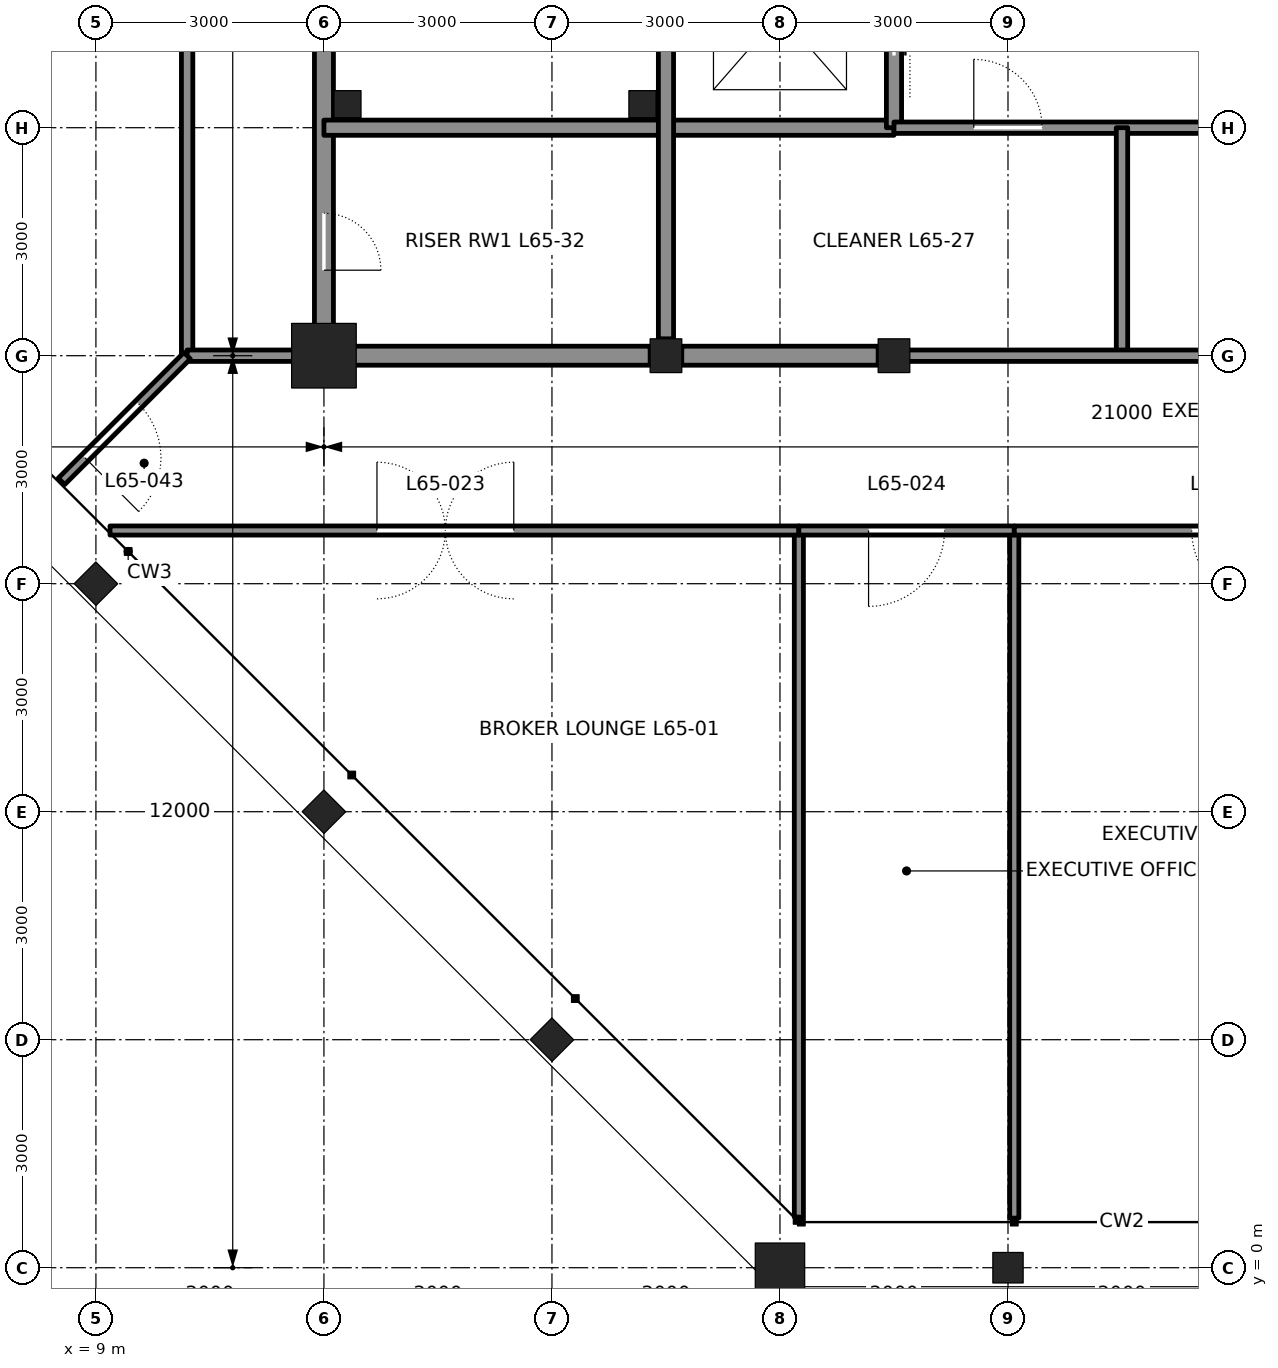
"""IFC4 building model, lengths in metres.
Left out: names, types, materials, properties, quantities, classifications, styles, units other than length and angle.
Written with IfcOpenShell. Run it as: python <this file> out.ifc"""

import sys

from ifc_helpers import new_model, si_unit, direction, frame, frame_2d, origin, origin_2d, place, context, subcontext, project, spatial, rectangle, hollow_rectangle, i_section, extrude, element, fill, save


model = new_model("IFC4")
c1 = context("Model", 3, precision=1e-05, world=origin(), true_north=direction((0.0, 1.0)))
c2 = subcontext(c1, "Body", "Model", "MODEL_VIEW")
j1 = project(units=[si_unit("LENGTHUNIT", "METRE"), si_unit("PLANEANGLEUNIT", "RADIAN")], contexts=[c1])
p1 = place(None, origin())
s1 = spatial("IfcSite", under=j1, at=p1, CompositionType="ELEMENT")
p2 = place(p1, origin())
s2 = spatial("IfcBuilding", under=s1, at=p2, CompositionType="ELEMENT")
p3 = place(p2, frame((0.0, 0.0, 291.6)))
s3 = spatial("IfcBuildingStorey", under=s2, at=p3, CompositionType="ELEMENT", Elevation=291.6)
p4 = place(p3, frame((18.0, 0.0, 0.0), z_axis=(0.0, 0.0, 1.0), x_axis=(0.0, -1.0, 0.0)))
e1 = element("IfcColumn", 1, at=p4, inside=s3, PredefinedType="COLUMN", context=c2, shape_type="SweptSolid", body=[
    extrude(hollow_rectangle(XDim=0.65, YDim=0.65, WallThickness=0.065, at=origin_2d()), origin(), (0.0, 0.0, 1.0), 4.2),
])
p5 = place(p3, frame((21.0, 0.0, 0.0), z_axis=(0.0, 0.0, 1.0), x_axis=(0.0, -1.0, 0.0)))
e2 = element("IfcColumn", 2, at=p5, inside=s3, PredefinedType="COLUMN", context=c2, shape_type="SweptSolid", body=[
    extrude(i_section(OverallWidth=0.401, OverallDepth=0.399, WebThickness=0.025, FlangeThickness=0.04, at=origin_2d()), origin(), (0.0, 0.0, 1.0), 4.2),
])
for number, where, z_axis, x_axis in (
    (3, (9.0, 9.0, 0.0), (0.0, 0.0, 1.0), (-0.707, -0.707, 0.0)),
    (4, (12.0, 6.0, 0.0), (0.0, 0.0, 1.0), (-0.707, -0.707, 0.0)),
    (5, (15.0, 3.0, 0.0), (0.0, 0.0, 1.0), (-0.707, -0.707, 0.0)),
):
    element("IfcColumn", number, at=place(p3, frame(where, z_axis=z_axis, x_axis=x_axis)), inside=s3, PredefinedType="COLUMN", context=c2, shape_type="SweptSolid", body=[
        extrude(i_section(OverallWidth=0.404, OverallDepth=0.406, WebThickness=0.027, FlangeThickness=0.044, at=origin_2d()), origin(), (0.0, 0.0, 1.0), 4.2),
    ])
p6 = place(p3, frame((12.0, 12.0, 0.0), z_axis=(0.0, 0.0, 1.0), x_axis=(1.0, 0.0, 0.0)))
e6 = element("IfcColumn", 6, at=p6, inside=s3, PredefinedType="COLUMN", context=c2, shape_type="SweptSolid", body=[
    extrude(hollow_rectangle(XDim=0.85, YDim=0.85, WallThickness=0.085, at=origin_2d()), origin(), (0.0, 0.0, 1.0), 4.2),
])
for number, where, z_axis, x_axis in (
    (7, (16.5, 12.0, 0.0), (0.0, 0.0, 1.0), (1.0, 0.0, 0.0)),
    (8, (19.5, 12.0, 0.0), (0.0, 0.0, 1.0), (1.0, 0.0, 0.0)),
):
    element("IfcColumn", number, at=place(p3, frame(where, z_axis=z_axis, x_axis=x_axis)), inside=s3, PredefinedType="COLUMN", context=c2, shape_type="SweptSolid", body=[
        extrude(i_section(OverallWidth=0.417, OverallDepth=0.445, WebThickness=0.039, FlangeThickness=0.063, at=origin_2d()), origin(), (0.0, 0.0, 1.0), 4.2),
    ])
p7 = place(p3, frame((12.0, 12.25, 0.0), z_axis=(0.0, 0.0, 1.0), x_axis=(0.0, 1.0, 0.0)))
e9 = element("IfcWall", 9, at=p7, inside=s3, PredefinedType="SOLIDWALL", context=c2, shape_type="SweptSolid", body=[
    extrude(rectangle(XDim=8.528, YDim=0.25, at=frame_2d((4.264, 0.0))), origin(), (0.0, 0.0, 1.0), 3.113),
])
p8 = place(p7, frame((0.875, 0.0, 0.0)))
e10 = element("IfcOpeningElement", 10, at=p8, cuts=e9, PredefinedType="OPENING", context=c2, shape_type="SweptSolid", body=[
    extrude(rectangle(XDim=0.75, YDim=2.1, at=frame_2d((0.375, 1.05))), frame((0.0, 0.135, 0.0), z_axis=(0.0, -1.0, 0.0), x_axis=(1.0, 0.0, 0.0)), (0.0, 0.0, 1.0), 0.27),
])
p9 = place(p3, frame((12.25, 12.0, 0.0), z_axis=(0.0, 0.0, 1.0), x_axis=(1.0, 0.0, 0.0)))
e11 = element("IfcWall", 11, at=p9, inside=s3, PredefinedType="SOLIDWALL", context=c2, shape_type="SweptSolid", body=[
    extrude(rectangle(XDim=4.042, YDim=0.25, at=frame_2d((2.021, 0.0))), origin(), (0.0, 0.0, 1.0), 3.181),
])
p10 = place(p3, frame((16.708, 12.0, 0.0), z_axis=(0.0, 0.0, 1.0), x_axis=(1.0, 0.0, 0.0)))
e12 = element("IfcWall", 12, at=p10, inside=s3, PredefinedType="SOLIDWALL", context=c2, shape_type="SweptSolid", body=[
    extrude(rectangle(XDim=2.583, YDim=0.25, at=frame_2d((1.292, 0.0))), origin(), (0.0, 0.0, 1.0), 3.181),
])
p11 = place(p3, frame((12.0, 15.0, 0.0), z_axis=(0.0, 0.0, 1.0), x_axis=(1.0, 0.0, 0.0)))
e13 = element("IfcWall", 13, at=p11, inside=s3, PredefinedType="SOLIDWALL", context=c2, shape_type="SweptSolid", body=[
    extrude(rectangle(XDim=7.5, YDim=0.2, at=frame_2d((3.75, 0.0))), origin(), (0.0, 0.0, 1.0), 4.04),
])
p12 = place(p3, frame((16.5, 12.222, 0.0), z_axis=(0.0, 0.0, 1.0), x_axis=(0.0, 1.0, 0.0)))
e14 = element("IfcWall", 14, at=p12, inside=s3, PredefinedType="SOLIDWALL", context=c2, shape_type="SweptSolid", body=[
    extrude(rectangle(XDim=8.555, YDim=0.2, at=frame_2d((4.278, 0.0))), origin(), (0.0, 0.0, 1.0), 3.113),
])
p13 = place(p3, frame((19.5, 15.0, 0.0), z_axis=(0.0, 0.0, 1.0), x_axis=(0.0, 1.0, 0.0)))
e15 = element("IfcWall", 15, at=p13, inside=s3, PredefinedType="SOLIDWALL", context=c2, shape_type="SweptSolid", body=[
    extrude(rectangle(XDim=12.0, YDim=0.2, at=frame_2d((6.0, 0.0))), origin(), (0.0, 0.0, 1.0), 3.064),
])
p14 = place(p13, frame((0.95, 0.0, 0.0)))
e16 = element("IfcOpeningElement", 16, at=p14, cuts=e15, PredefinedType="OPENING", context=c2, shape_type="SweptSolid", body=[
    extrude(rectangle(XDim=1.1, YDim=2.1, at=frame_2d((0.55, 1.05))), frame((0.0, 0.11, 0.0), z_axis=(0.0, -1.0, 0.0), x_axis=(1.0, 0.0, 0.0)), (0.0, 0.0, 1.0), 0.22),
])
p15 = place(p13, frame((3.95, 0.0, 0.0)))
e17 = element("IfcOpeningElement", 17, at=p15, cuts=e15, PredefinedType="OPENING", context=c2, shape_type="SweptSolid", body=[
    extrude(rectangle(XDim=1.1, YDim=2.1, at=frame_2d((0.55, 1.05))), frame((0.0, 0.11, 0.0), z_axis=(0.0, -1.0, 0.0), x_axis=(1.0, 0.0, 0.0)), (0.0, 0.0, 1.0), 0.22),
])
p16 = place(p13, frame((6.95, 0.0, 0.0)))
e18 = element("IfcOpeningElement", 18, at=p16, cuts=e15, PredefinedType="OPENING", context=c2, shape_type="SweptSolid", body=[
    extrude(rectangle(XDim=1.1, YDim=2.1, at=frame_2d((0.55, 1.05))), frame((0.0, 0.11, 0.0), z_axis=(0.0, -1.0, 0.0), x_axis=(1.0, 0.0, 0.0)), (0.0, 0.0, 1.0), 0.22),
])
p17 = place(p13, frame((9.95, 0.0, 0.0)))
e19 = element("IfcOpeningElement", 19, at=p17, cuts=e15, PredefinedType="OPENING", context=c2, shape_type="SweptSolid", body=[
    extrude(rectangle(XDim=1.1, YDim=2.1, at=frame_2d((0.55, 1.05))), frame((0.0, 0.11, 0.0), z_axis=(0.0, -1.0, 0.0), x_axis=(1.0, 0.0, 0.0)), (0.0, 0.0, 1.0), 0.22),
])
p18 = place(p3, frame((19.5, 15.0, 0.0), z_axis=(0.0, 0.0, 1.0), x_axis=(1.0, 0.0, 0.0)))
e20 = element("IfcWall", 20, at=p18, inside=s3, PredefinedType="PARTITIONING", context=c2, shape_type="SweptSolid", body=[
    extrude(rectangle(XDim=6.0, YDim=0.15, at=frame_2d((3.0, 0.0))), origin(), (0.0, 0.0, 1.0), 4.04),
])
p19 = place(p18, frame((4.0, 0.0, 0.0)))
e21 = element("IfcOpeningElement", 21, at=p19, cuts=e20, PredefinedType="OPENING", context=c2, shape_type="SweptSolid", body=[
    extrude(rectangle(XDim=1.0, YDim=2.1, at=frame_2d((0.5, 1.05))), frame((0.0, 0.085, 0.0), z_axis=(0.0, -1.0, 0.0), x_axis=(1.0, 0.0, 0.0)), (0.0, 0.0, 1.0), 0.17),
])
p20 = place(p18, frame((1.05, 0.0, 0.0)))
e22 = element("IfcOpeningElement", 22, at=p20, cuts=e20, PredefinedType="OPENING", context=c2, shape_type="SweptSolid", body=[
    extrude(rectangle(XDim=0.9, YDim=2.1, at=frame_2d((0.45, 1.05))), frame((0.0, 0.085, 0.0), z_axis=(0.0, -1.0, 0.0), x_axis=(1.0, 0.0, 0.0)), (0.0, 0.0, 1.0), 0.17),
])
p21 = place(p3, frame((22.5, 15.0, 0.0), z_axis=(0.0, 0.0, 1.0), x_axis=(0.0, -1.0, 0.0)))
e23 = element("IfcWall", 23, at=p21, inside=s3, PredefinedType="PARTITIONING", context=c2, shape_type="SweptSolid", body=[
    extrude(rectangle(XDim=3.0, YDim=0.15, at=frame_2d((1.5, 0.0))), origin(), (0.0, 0.0, 1.0), 4.04),
])
p22 = place(p3, frame((19.5, 12.0, 0.0), z_axis=(0.0, 0.0, 1.0), x_axis=(1.0, 0.0, 0.0)))
e24 = element("IfcWall", 24, at=p22, inside=s3, PredefinedType="PARTITIONING", context=c2, shape_type="SweptSolid", body=[
    extrude(rectangle(XDim=6.0, YDim=0.15, at=frame_2d((3.0, 0.0))), origin(), (0.0, 0.0, 1.0), 3.181),
])
p23 = place(p3, frame((18.249, 0.666, 0.0), z_axis=(0.0, 0.0, 1.0), x_axis=(0.0, 1.0, 0.0)))
e25 = element("IfcWall", 25, at=p23, inside=s3, PredefinedType="PARTITIONING", context=c2, shape_type="SweptSolid", body=[
    extrude(rectangle(XDim=9.034, YDim=0.12, at=frame_2d((4.517, 0.0))), origin(), (0.0, 0.0, 1.0), 4.04),
])
p24 = place(p3, frame((21.083, 0.653, 0.0), z_axis=(0.0, 0.0, 1.0), x_axis=(0.0, 1.0, 0.0)))
e26 = element("IfcWall", 26, at=p24, inside=s3, PredefinedType="PARTITIONING", context=c2, shape_type="SweptSolid", body=[
    extrude(rectangle(XDim=9.047, YDim=0.12, at=frame_2d((4.524, 0.0))), origin(), (0.0, 0.0, 1.0), 3.357),
])
p25 = place(p3, frame((9.186, 9.7, 0.0), z_axis=(0.0, 0.0, 1.0), x_axis=(1.0, 0.0, 0.0)))
e27 = element("IfcWall", 27, at=p25, inside=s3, PredefinedType="PARTITIONING", context=c2, shape_type="SweptSolid", body=[
    extrude(rectangle(XDim=9.063, YDim=0.12, at=frame_2d((4.531, 0.0))), origin(), (0.0, 0.0, 1.0), 4.04),
])
p26 = place(p25, frame((3.512, 0.0, 0.0)))
e28 = element("IfcOpeningElement", 28, at=p26, cuts=e27, PredefinedType="OPENING", context=c2, shape_type="SweptSolid", body=[
    extrude(rectangle(XDim=1.8, YDim=2.4, at=frame_2d((0.9, 1.2))), frame((0.0, 0.07, 0.0), z_axis=(0.0, -1.0, 0.0), x_axis=(1.0, 0.0, 0.0)), (0.0, 0.0, 1.0), 0.14),
])
p27 = place(p3, frame((18.249, 9.7, 0.0), z_axis=(0.0, 0.0, 1.0), x_axis=(1.0, 0.0, 0.0)))
e29 = element("IfcWall", 29, at=p27, inside=s3, PredefinedType="PARTITIONING", context=c2, shape_type="SweptSolid", body=[
    extrude(rectangle(XDim=2.834, YDim=0.12, at=frame_2d((1.417, 0.0))), origin(), (0.0, 0.0, 1.0), 4.04),
])
p28 = place(p27, frame((0.917, 0.0, 0.0)))
e30 = element("IfcOpeningElement", 30, at=p28, cuts=e29, PredefinedType="OPENING", context=c2, shape_type="SweptSolid", body=[
    extrude(rectangle(XDim=1.0, YDim=2.4, at=frame_2d((0.5, 1.2))), frame((0.0, 0.07, 0.0), z_axis=(0.0, -1.0, 0.0), x_axis=(1.0, 0.0, 0.0)), (0.0, 0.0, 1.0), 0.14),
])
p29 = place(p3, frame((21.083, 9.7, 0.0), z_axis=(0.0, 0.0, 1.0), x_axis=(1.0, 0.0, 0.0)))
e31 = element("IfcWall", 31, at=p29, inside=s3, PredefinedType="PARTITIONING", context=c2, shape_type="SweptSolid", body=[
    extrude(rectangle(XDim=5.669, YDim=0.12, at=frame_2d((2.834, 0.0))), origin(), (0.0, 0.0, 1.0), 4.04),
])
p30 = place(p29, frame((2.334, 0.0, 0.0)))
e32 = element("IfcOpeningElement", 32, at=p30, cuts=e31, PredefinedType="OPENING", context=c2, shape_type="SweptSolid", body=[
    extrude(rectangle(XDim=1.0, YDim=2.4, at=frame_2d((0.5, 1.2))), frame((0.0, 0.07, 0.0), z_axis=(0.0, -1.0, 0.0), x_axis=(1.0, 0.0, 0.0)), (0.0, 0.0, 1.0), 0.14),
])
p31 = place(p3, frame((10.2, 12.0, 0.0), z_axis=(0.0, 0.0, 1.0), x_axis=(0.0, 1.0, 0.0)))
e33 = element("IfcWall", 33, at=p31, inside=s3, PredefinedType="PARTITIONING", context=c2, shape_type="SweptSolid", body=[
    extrude(rectangle(XDim=24.314, YDim=0.15, at=frame_2d((12.157, 0.0))), origin(), (0.0, 0.0, 1.0), 4.04),
])
p32 = place(p31, frame((11.5, 0.0, 0.0)))
e34 = element("IfcOpeningElement", 34, at=p32, cuts=e33, PredefinedType="OPENING", context=c2, shape_type="SweptSolid", body=[
    extrude(rectangle(XDim=1.0, YDim=2.4, at=frame_2d((0.5, 1.2))), frame((0.0, 0.085, 0.0), z_axis=(0.0, -1.0, 0.0), x_axis=(1.0, 0.0, 0.0)), (0.0, 0.0, 1.0), 0.17),
])
p33 = place(p3, frame((10.2, 12.0, 0.0), z_axis=(0.0, 0.0, 1.0), x_axis=(1.0, 0.0, 0.0)))
e35 = element("IfcWall", 35, at=p33, inside=s3, PredefinedType="PARTITIONING", context=c2, shape_type="SweptSolid", body=[
    extrude(rectangle(XDim=1.8, YDim=0.15, at=frame_2d((0.9, 0.0))), origin(), (0.0, 0.0, 1.0), 3.27),
])
p34 = place(p3, frame((10.2, 12.0, 0.0), z_axis=(0.0, 0.0, 1.0), x_axis=(-0.707106781187, -0.707106781187, 0.0)))
e36 = element("IfcWall", 36, at=p34, inside=s3, PredefinedType="PARTITIONING", context=c2, shape_type="SweptSolid", body=[
    extrude(rectangle(XDim=2.338, YDim=0.12, at=frame_2d((1.169, 0.0))), origin(), (0.0, 0.0, 1.0), 4.04),
])
p35 = place(p34, frame((0.9, 0.0, 0.0)))
e37 = element("IfcOpeningElement", 37, at=p35, cuts=e36, PredefinedType="OPENING", context=c2, shape_type="SweptSolid", body=[
    extrude(rectangle(XDim=1.0, YDim=2.4, at=frame_2d((0.5, 1.2))), frame((0.0, 0.07, 0.0), z_axis=(0.0, -1.0, 0.0), x_axis=(1.0, 0.0, 0.0)), (0.0, 0.0, 1.0), 0.14),
])
for number, where, z_axis, x_axis in (
    (38, (12.31, 15.31, 0.0), (0.0, 0.0, 1.0), (1.0, 0.0, 0.0)),
    (39, (16.19, 15.31, 0.0), (0.0, 0.0, 1.0), (1.0, 0.0, 0.0)),
):
    element("IfcColumn", number, at=place(p3, frame(where, z_axis=z_axis, x_axis=x_axis)), inside=s3, PredefinedType="COLUMN", context=c2, shape_type="SweptSolid", body=[
        extrude(hollow_rectangle(XDim=0.356, YDim=0.356, WallThickness=0.009, at=origin_2d()), origin(), (0.0, 0.0, 1.0), 4.2),
    ])
p36 = place(p8, frame((0.75, 0.0, 0.0), z_axis=(0.0, 0.0, 1.0), x_axis=(-1.0, 0.0, 0.0)))
e40 = element("IfcDoor", 40, at=p36, inside=s3, OperationType="SINGLE_SWING_RIGHT", PredefinedType="DOOR", context=c2, shape_type="SweptSolid", body=[
    extrude(rectangle(XDim=0.75, YDim=2.1, at=frame_2d((0.375, 1.05))), frame((0.0, 0.025, 0.0), z_axis=(0.0, -1.0, 0.0), x_axis=(1.0, 0.0, 0.0)), (0.0, 0.0, 1.0), 0.05),
])
fill(e10, e40)
p37 = place(p20, origin())
e41 = element("IfcDoor", 41, at=p37, inside=s3, OperationType="SINGLE_SWING_LEFT", PredefinedType="DOOR", context=c2, shape_type="SweptSolid", body=[
    extrude(rectangle(XDim=0.9, YDim=2.1, at=frame_2d((0.45, 1.05))), frame((0.0, 0.025, 0.0), z_axis=(0.0, -1.0, 0.0), x_axis=(1.0, 0.0, 0.0)), (0.0, 0.0, 1.0), 0.05),
])
fill(e22, e41)
p38 = place(p14, origin())
e42 = element("IfcDoor", 42, at=p38, inside=s3, OperationType="DOUBLE_DOOR_SLIDING", PredefinedType="DOOR", context=c2, shape_type="SweptSolid", body=[
    extrude(rectangle(XDim=1.1, YDim=2.1, at=frame_2d((0.55, 1.05))), frame((0.0, 0.025, 0.0), z_axis=(0.0, -1.0, 0.0), x_axis=(1.0, 0.0, 0.0)), (0.0, 0.0, 1.0), 0.05),
])
fill(e16, e42)
p39 = place(p26, origin())
e43 = element("IfcDoor", 43, at=p39, inside=s3, OperationType="DOUBLE_DOOR_DOUBLE_SWING", PredefinedType="DOOR", context=c2, shape_type="SweptSolid", body=[
    extrude(rectangle(XDim=1.8, YDim=2.4, at=frame_2d((0.9, 1.2))), frame((0.0, 0.025, 0.0), z_axis=(0.0, -1.0, 0.0), x_axis=(1.0, 0.0, 0.0)), (0.0, 0.0, 1.0), 0.05),
])
fill(e28, e43)
p40 = place(p28, frame((1.0, 0.0, 0.0), z_axis=(0.0, 0.0, 1.0), x_axis=(-1.0, 0.0, 0.0)))
e44 = element("IfcDoor", 44, at=p40, inside=s3, OperationType="SINGLE_SWING_RIGHT", PredefinedType="DOOR", context=c2, shape_type="SweptSolid", body=[
    extrude(rectangle(XDim=1.0, YDim=2.4, at=frame_2d((0.5, 1.2))), frame((0.0, 0.025, 0.0), z_axis=(0.0, -1.0, 0.0), x_axis=(1.0, 0.0, 0.0)), (0.0, 0.0, 1.0), 0.05),
])
fill(e30, e44)
p41 = place(p30, frame((1.0, 0.0, 0.0), z_axis=(0.0, 0.0, 1.0), x_axis=(-1.0, 0.0, 0.0)))
e45 = element("IfcDoor", 45, at=p41, inside=s3, OperationType="SINGLE_SWING_LEFT", PredefinedType="DOOR", context=c2, shape_type="SweptSolid", body=[
    extrude(rectangle(XDim=1.0, YDim=2.4, at=frame_2d((0.5, 1.2))), frame((0.0, 0.025, 0.0), z_axis=(0.0, -1.0, 0.0), x_axis=(1.0, 0.0, 0.0)), (0.0, 0.0, 1.0), 0.05),
])
fill(e32, e45)
p42 = place(p35, origin())
e46 = element("IfcDoor", 46, at=p42, inside=s3, OperationType="SINGLE_SWING_RIGHT", PredefinedType="DOOR", context=c2, shape_type="SweptSolid", body=[
    extrude(rectangle(XDim=1.0, YDim=2.4, at=frame_2d((0.5, 1.2))), frame((0.0, 0.025, 0.0), z_axis=(0.0, -1.0, 0.0), x_axis=(1.0, 0.0, 0.0)), (0.0, 0.0, 1.0), 0.05),
])
fill(e37, e46)
save(model, sys.argv[1])
